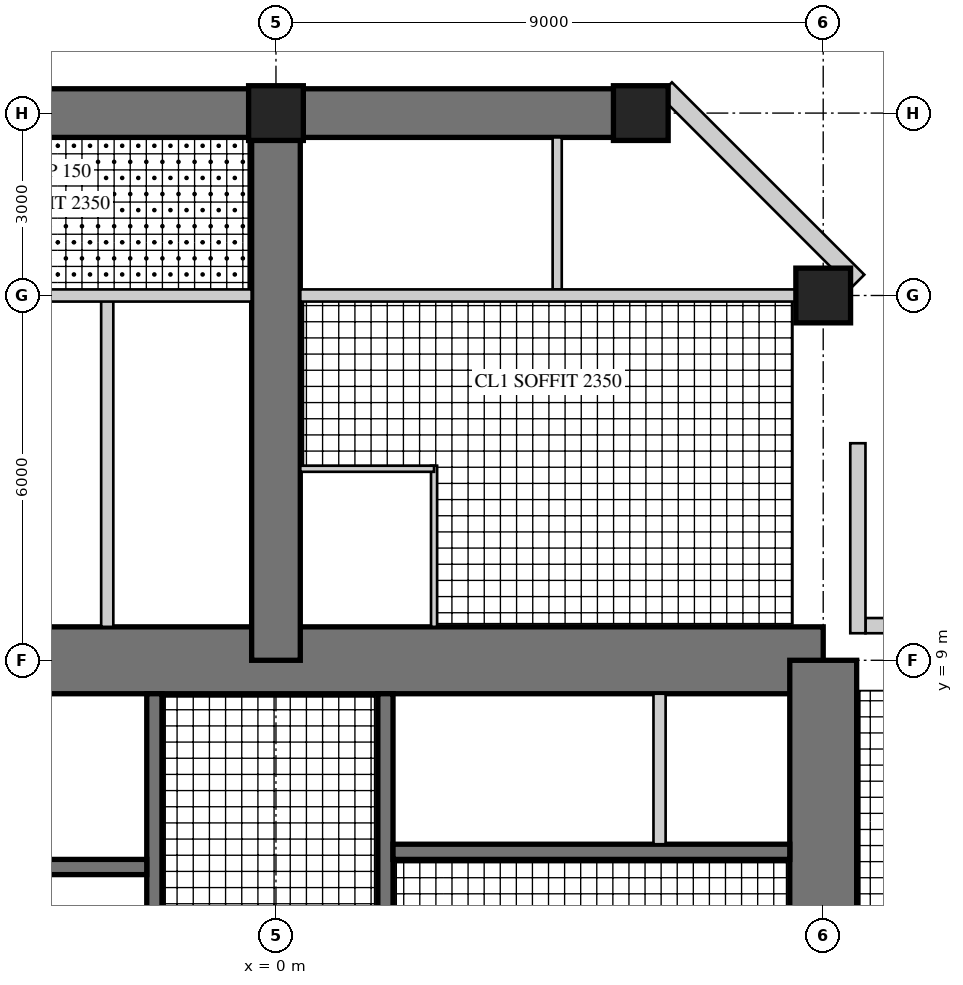
"""IFC4 building model, lengths in metres.
Left out: names, types, materials, properties, quantities, classifications, styles, units other than length and angle.
Written with IfcOpenShell. Run it as: python <this file> out.ifc"""

import sys

from ifc_helpers import new_model, si_unit, direction, frame, frame_2d, origin, origin_2d, place, context, subcontext, project, spatial, rectangle, hollow_rectangle, extrude, element, fill, save


model = new_model("IFC4")
c1 = context("Model", 3, precision=1e-05, world=origin(), true_north=direction((0.0, 1.0)))
c2 = subcontext(c1, "Body", "Model", "MODEL_VIEW")
j1 = project(units=[si_unit("LENGTHUNIT", "METRE"), si_unit("PLANEANGLEUNIT", "RADIAN")], contexts=[c1])
p1 = place(None, origin())
s1 = spatial("IfcSite", under=j1, at=p1, CompositionType="ELEMENT")
p2 = place(p1, origin())
s2 = spatial("IfcBuilding", under=s1, at=p2, CompositionType="ELEMENT")
p3 = place(p2, frame((0.0, 0.0, 189.9)))
s3 = spatial("IfcBuildingStorey", under=s2, at=p3, CompositionType="ELEMENT", Elevation=189.9)
p4 = place(p3, frame((9.0, 9.0, 0.0), z_axis=(0.0, 0.0, 1.0), x_axis=(-1.0, 0.0, 0.0)))
e1 = element("IfcWall", 1, at=p4, inside=s3, PredefinedType="SHEAR", context=c2, shape_type="SweptSolid", body=[
    extrude(rectangle(XDim=18.0, YDim=1.1, at=frame_2d((9.0, 0.0))), origin(), (0.0, 0.0, 1.0), 3.4),
])
p5 = place(p4, frame((9.8, 0.0, 0.0)))
e2 = element("IfcOpeningElement", 2, at=p5, cuts=e1, PredefinedType="OPENING", context=c2, shape_type="SweptSolid", body=[
    extrude(rectangle(XDim=1.0, YDim=2.4, at=frame_2d((0.5, 1.2))), frame((0.0, 0.56, 0.0), z_axis=(0.0, -1.0, 0.0), x_axis=(1.0, 0.0, 0.0)), (0.0, 0.0, 1.0), 1.12),
])
p6 = place(p3, frame((9.0, -9.0, 0.0), z_axis=(0.0, 0.0, 1.0), x_axis=(0.0, 1.0, 0.0)))
e3 = element("IfcWall", 3, at=p6, inside=s3, PredefinedType="SHEAR", context=c2, shape_type="SweptSolid", body=[
    extrude(rectangle(XDim=18.0, YDim=1.1, at=frame_2d((9.0, 0.0))), origin(), (0.0, 0.0, 1.0), 3.4),
])
p7 = place(p6, frame((9.8, 0.0, 0.0)))
e4 = element("IfcOpeningElement", 4, at=p7, cuts=e3, PredefinedType="OPENING", context=c2, shape_type="SweptSolid", body=[
    extrude(rectangle(XDim=1.0, YDim=2.4, at=frame_2d((0.5, 1.2))), frame((0.0, 0.56, 0.0), z_axis=(0.0, -1.0, 0.0), x_axis=(1.0, 0.0, 0.0)), (0.0, 0.0, 1.0), 1.12),
])
p8 = place(p3, frame((1.8, 1.875, 0.0), z_axis=(0.0, 0.0, 1.0), x_axis=(0.0, 1.0, 0.0)))
e5 = element("IfcWall", 5, at=p8, inside=s3, PredefinedType="SHEAR", context=c2, shape_type="SweptSolid", body=[
    extrude(rectangle(XDim=6.575, YDim=0.25, at=frame_2d((3.288, 0.0))), origin(), (0.0, 0.0, 1.0), 3.4),
])
p9 = place(p8, frame((1.875, 0.0, 0.0)))
e6 = element("IfcOpeningElement", 6, at=p9, cuts=e5, PredefinedType="OPENING", context=c2, shape_type="SweptSolid", body=[
    extrude(rectangle(XDim=1.6, YDim=2.4, at=frame_2d((0.8, 1.2))), frame((0.0, 0.135, 0.0), z_axis=(0.0, -1.0, 0.0), x_axis=(1.0, 0.0, 0.0)), (0.0, 0.0, 1.0), 0.27),
])
p10 = place(p3, frame((1.925, 5.85, 0.0), z_axis=(0.0, 0.0, 1.0), x_axis=(1.0, 0.0, 0.0)))
e7 = element("IfcWall", 7, at=p10, inside=s3, PredefinedType="SHEAR", context=c2, shape_type="SweptSolid", body=[
    extrude(rectangle(XDim=6.525, YDim=0.25, at=frame_2d((3.262, 0.0))), origin(), (0.0, 0.0, 1.0), 3.4),
])
p11 = place(p10, frame((0.521, 0.0, 0.0)))
e8 = element("IfcOpeningElement", 8, at=p11, cuts=e7, PredefinedType="OPENING", context=c2, shape_type="SweptSolid", body=[
    extrude(rectangle(XDim=1.0, YDim=2.1, at=frame_2d((0.5, 1.05))), frame((0.0, 0.135, 0.0), z_axis=(0.0, -1.0, 0.0), x_axis=(1.0, 0.0, 0.0)), (0.0, 0.0, 1.0), 0.27),
])
p12 = place(p10, frame((5.004, 0.0, 0.0)))
e9 = element("IfcOpeningElement", 9, at=p12, cuts=e7, PredefinedType="OPENING", context=c2, shape_type="SweptSolid", body=[
    extrude(rectangle(XDim=1.0, YDim=2.1, at=frame_2d((0.5, 1.05))), frame((0.0, 0.135, 0.0), z_axis=(0.0, -1.0, 0.0), x_axis=(1.0, 0.0, 0.0)), (0.0, 0.0, 1.0), 0.27),
])
p13 = place(p3, frame((6.308, 5.975, 0.0), z_axis=(0.0, 0.0, 1.0), x_axis=(0.0, 1.0, 0.0)))
e10 = element("IfcWall", 10, at=p13, inside=s3, PredefinedType="PARTITIONING", context=c2, shape_type="SweptSolid", body=[
    extrude(rectangle(XDim=2.475, YDim=0.2, at=frame_2d((1.237, 0.0))), origin(), (0.0, 0.0, 1.0), 3.4),
])
p14 = place(p3, frame((-2.0, 1.675, 0.0), z_axis=(0.0, 0.0, 1.0), x_axis=(0.0, 1.0, 0.0)))
e11 = element("IfcWall", 11, at=p14, inside=s3, PredefinedType="SHEAR", context=c2, shape_type="SweptSolid", body=[
    extrude(rectangle(XDim=6.775, YDim=0.25, at=frame_2d((3.387, 0.0))), origin(), (0.0, 0.0, 1.0), 3.4),
])
p15 = place(p14, frame((0.725, 0.0, 0.0)))
e12 = element("IfcOpeningElement", 12, at=p15, cuts=e11, PredefinedType="OPENING", context=c2, shape_type="SweptSolid", body=[
    extrude(rectangle(XDim=1.0, YDim=2.1, at=frame_2d((0.5, 1.05))), frame((0.0, 0.135, 0.0), z_axis=(0.0, -1.0, 0.0), x_axis=(1.0, 0.0, 0.0)), (0.0, 0.0, 1.0), 0.27),
])
p16 = place(p3, frame((-2.125, 5.6, 0.0), z_axis=(0.0, 0.0, 1.0), x_axis=(-1.0, 0.0, 0.0)))
e13 = element("IfcWall", 13, at=p16, inside=s3, PredefinedType="SHEAR", context=c2, shape_type="SweptSolid", body=[
    extrude(rectangle(XDim=6.325, YDim=0.25, at=frame_2d((3.163, 0.0))), origin(), (0.0, 0.0, 1.0), 3.4),
])
p17 = place(p16, frame((0.175, 0.0, 0.0)))
e14 = element("IfcOpeningElement", 14, at=p17, cuts=e13, PredefinedType="OPENING", context=c2, shape_type="SweptSolid", body=[
    extrude(rectangle(XDim=1.0, YDim=2.1, at=frame_2d((0.5, 1.05))), frame((0.0, 0.135, 0.0), z_axis=(0.0, -1.0, 0.0), x_axis=(1.0, 0.0, 0.0)), (0.0, 0.0, 1.0), 0.27),
])
p18 = place(p3, frame((0.0, 9.0, 0.0), z_axis=(0.0, 0.0, 1.0), x_axis=(0.0, 1.0, 0.0)))
e15 = element("IfcWall", 15, at=p18, inside=s3, PredefinedType="SHEAR", context=c2, shape_type="SweptSolid", body=[
    extrude(rectangle(XDim=9.0, YDim=0.8, at=frame_2d((4.5, 0.0))), origin(), (0.0, 0.0, 1.0), 3.4),
])
p19 = place(p18, frame((3.95, 0.0, 0.0)))
e16 = element("IfcOpeningElement", 16, at=p19, cuts=e15, PredefinedType="OPENING", context=c2, shape_type="SweptSolid", body=[
    extrude(rectangle(XDim=1.0, YDim=2.15, at=frame_2d((0.5, 1.075))), frame((0.0, 0.41, 0.0), z_axis=(0.0, -1.0, 0.0), x_axis=(1.0, 0.0, 0.0)), (0.0, 0.0, 1.0), 0.82),
])
p20 = place(p18, frame((7.0, 0.0, 0.0)))
e17 = element("IfcOpeningElement", 17, at=p20, cuts=e15, PredefinedType="OPENING", context=c2, shape_type="SweptSolid", body=[
    extrude(rectangle(XDim=1.0, YDim=2.2, at=frame_2d((0.5, 1.1))), frame((0.0, 0.41, 0.0), z_axis=(0.0, -1.0, 0.0), x_axis=(1.0, 0.0, 0.0)), (0.0, 0.0, 1.0), 0.82),
])
p21 = place(p3, frame((6.0, 18.0, 0.0), z_axis=(0.0, 0.0, 1.0), x_axis=(-1.0, 0.0, 0.0)))
e18 = element("IfcWall", 18, at=p21, inside=s3, PredefinedType="SHEAR", context=c2, shape_type="SweptSolid", body=[
    extrude(rectangle(XDim=12.0, YDim=0.8, at=frame_2d((6.0, 0.0))), origin(), (0.0, 0.0, 1.0), 3.4),
])
p22 = place(p21, frame((1.625, 0.0, 0.6)))
e19 = element("IfcOpeningElement", 19, at=p22, cuts=e18, PredefinedType="OPENING", context=c2, shape_type="SweptSolid", body=[
    extrude(rectangle(XDim=3.0, YDim=2.4, at=frame_2d((1.5, 1.2))), frame((0.0, 0.41, 0.0), z_axis=(0.0, -1.0, 0.0), x_axis=(1.0, 0.0, 0.0)), (0.0, 0.0, 1.0), 0.82),
])
p23 = place(p21, frame((7.375, 0.0, 0.6)))
e20 = element("IfcOpeningElement", 20, at=p23, cuts=e18, PredefinedType="OPENING", context=c2, shape_type="SweptSolid", body=[
    extrude(rectangle(XDim=3.0, YDim=2.4, at=frame_2d((1.5, 1.2))), frame((0.0, 0.41, 0.0), z_axis=(0.0, -1.0, 0.0), x_axis=(1.0, 0.0, 0.0)), (0.0, 0.0, 1.0), 0.82),
])
for number, where, z_axis, x_axis in (
    (21, (9.0, 15.0, 0.0), (0.0, 0.0, 1.0), (1.0, 0.0, 0.0)),
    (22, (6.0, 18.0, 0.0), (0.0, 0.0, 1.0), (1.0, 0.0, 0.0)),
    (23, (0.0, 18.0, 0.0), (0.0, 0.0, 1.0), (1.0, 0.0, 0.0)),
):
    element("IfcColumn", number, at=place(p3, frame(where, z_axis=z_axis, x_axis=x_axis)), inside=s3, PredefinedType="COLUMN", context=c2, shape_type="SweptSolid", body=[
        extrude(rectangle(XDim=0.9, YDim=0.9, at=origin_2d()), origin(), (0.0, 0.0, 1.0), 3.4),
    ])
p24 = place(p3, frame((12.57, 9.57, 0.0), z_axis=(0.0, 0.0, 1.0), x_axis=(-1.0, 0.0, 0.0)))
e24 = element("IfcWall", 24, at=p24, inside=s3, PredefinedType="SOLIDWALL", context=c2, shape_type="SweptSolid", body=[
    extrude(rectangle(XDim=2.875, YDim=0.25, at=frame_2d((1.438, 0.0))), origin(), (0.0, 0.0, 1.0), 3.22),
])
p25 = place(p24, frame((0.6, 0.0, 0.0)))
e25 = element("IfcOpeningElement", 25, at=p25, cuts=e24, PredefinedType="OPENING", context=c2, shape_type="SweptSolid", body=[
    extrude(rectangle(XDim=1.0, YDim=2.2, at=frame_2d((0.5, 1.1))), frame((0.0, 0.135, 0.0), z_axis=(0.0, -1.0, 0.0), x_axis=(1.0, 0.0, 0.0)), (0.0, 0.0, 1.0), 0.27),
])
p26 = place(p3, frame((9.57, 9.445, 0.0), z_axis=(0.0, 0.0, 1.0), x_axis=(0.0, 1.0, 0.0)))
e26 = element("IfcWall", 26, at=p26, inside=s3, PredefinedType="SOLIDWALL", context=c2, shape_type="SweptSolid", body=[
    extrude(rectangle(XDim=3.125, YDim=0.25, at=frame_2d((1.562, 0.0))), origin(), (0.0, 0.0, 1.0), 3.22),
])
p27 = place(p26, frame((0.6, 0.0, 0.0)))
e27 = element("IfcOpeningElement", 27, at=p27, cuts=e26, PredefinedType="OPENING", context=c2, shape_type="SweptSolid", body=[
    extrude(rectangle(XDim=1.0, YDim=2.2, at=frame_2d((0.5, 1.1))), frame((0.0, 0.135, 0.0), z_axis=(0.0, -1.0, 0.0), x_axis=(1.0, 0.0, 0.0)), (0.0, 0.0, 1.0), 0.27),
])
p28 = place(p3, frame((9.57, 15.236, 0.0), z_axis=(0.0, 0.0, 1.0), x_axis=(-0.707134062067, 0.707079499254, 0.0)))
e28 = element("IfcWall", 28, at=p28, inside=s3, PredefinedType="SOLIDWALL", context=c2, shape_type="SweptSolid", body=[
    extrude(rectangle(XDim=4.475, YDim=0.3, at=frame_2d((2.237, 0.0))), origin(), (0.0, 0.0, 1.0), 3.22),
])
p29 = place(p28, frame((1.787, 0.0, 0.3)))
e29 = element("IfcOpeningElement", 29, at=p29, cuts=e28, PredefinedType="OPENING", context=c2, shape_type="SweptSolid", body=[
    extrude(rectangle(XDim=0.9, YDim=2.4, at=frame_2d((0.45, 1.2))), frame((0.0, 0.16, 0.0), z_axis=(0.0, -1.0, 0.0), x_axis=(1.0, 0.0, 0.0)), (0.0, 0.0, 1.0), 0.32),
])
p30 = place(p3, frame((2.6, 9.55, 0.0), z_axis=(0.0, 0.0, 1.0), x_axis=(0.0, 1.0, 0.0)))
e30 = element("IfcWall", 30, at=p30, inside=s3, PredefinedType="PARTITIONING", context=c2, shape_type="SweptSolid", body=[
    extrude(rectangle(XDim=2.65, YDim=0.1, at=frame_2d((1.325, 0.0))), origin(), (0.0, 0.0, 1.0), 3.22),
])
p31 = place(p3, frame((2.6, 12.15, 0.0), z_axis=(0.0, 0.0, 1.0), x_axis=(-1.0, 0.0, 0.0)))
e31 = element("IfcWall", 31, at=p31, inside=s3, PredefinedType="PARTITIONING", context=c2, shape_type="SweptSolid", body=[
    extrude(rectangle(XDim=2.2, YDim=0.1, at=frame_2d((1.1, 0.0))), origin(), (0.0, 0.0, 1.0), 3.22),
])
p32 = place(p31, frame((0.55, 0.0, 0.0)))
e32 = element("IfcOpeningElement", 32, at=p32, cuts=e31, PredefinedType="OPENING", context=c2, shape_type="SweptSolid", body=[
    extrude(rectangle(XDim=0.9, YDim=2.1, at=frame_2d((0.45, 1.05))), frame((0.0, 0.06, 0.0), z_axis=(0.0, -1.0, 0.0), x_axis=(1.0, 0.0, 0.0)), (0.0, 0.0, 1.0), 0.12),
])
p33 = place(p3, frame((-2.775, 9.55, 0.0), z_axis=(0.0, 0.0, 1.0), x_axis=(0.0, 1.0, 0.0)))
e33 = element("IfcWall", 33, at=p33, inside=s3, PredefinedType="SOLIDWALL", context=c2, shape_type="SweptSolid", body=[
    extrude(rectangle(XDim=5.45, YDim=0.2, at=frame_2d((2.725, 0.0))), origin(), (0.0, 0.0, 1.0), 3.22),
])
p34 = place(p33, frame((1.2, 0.0, 0.0)))
e34 = element("IfcOpeningElement", 34, at=p34, cuts=e33, PredefinedType="OPENING", context=c2, shape_type="SweptSolid", body=[
    extrude(rectangle(XDim=1.0, YDim=2.2, at=frame_2d((0.5, 1.1))), frame((0.0, 0.11, 0.0), z_axis=(0.0, -1.0, 0.0), x_axis=(1.0, 0.0, 0.0)), (0.0, 0.0, 1.0), 0.22),
])
p35 = place(p3, frame((4.625, 15.1, 0.0), z_axis=(0.0, 0.0, 1.0), x_axis=(0.0, 1.0, 0.0)))
e35 = element("IfcWall", 35, at=p35, inside=s3, PredefinedType="PARTITIONING", context=c2, shape_type="SweptSolid", body=[
    extrude(rectangle(XDim=2.5, YDim=0.15, at=frame_2d((1.25, 0.0))), origin(), (0.0, 0.0, 1.0), 3.22),
])
p36 = place(p35, frame((0.6, 0.0, 0.0)))
e36 = element("IfcOpeningElement", 36, at=p36, cuts=e35, PredefinedType="OPENING", context=c2, shape_type="SweptSolid", body=[
    extrude(rectangle(XDim=1.0, YDim=2.1, at=frame_2d((0.5, 1.05))), frame((0.0, 0.085, 0.0), z_axis=(0.0, -1.0, 0.0), x_axis=(1.0, 0.0, 0.0)), (0.0, 0.0, 1.0), 0.17),
])
p37 = place(p3, frame((8.55, 15.0, 0.0), z_axis=(0.0, 0.0, 1.0), x_axis=(-1.0, 0.0, 0.0)))
e37 = element("IfcWall", 37, at=p37, inside=s3, PredefinedType="SOLIDWALL", context=c2, shape_type="SweptSolid", body=[
    extrude(rectangle(XDim=8.15, YDim=0.2, at=frame_2d((4.075, 0.0))), origin(), (0.0, 0.0, 1.0), 2.47),
])
p38 = place(p3, frame((-0.4, 15.0, 0.0), z_axis=(0.0, 0.0, 1.0), x_axis=(-1.0, 0.0, 0.0)))
e38 = element("IfcWall", 38, at=p38, inside=s3, PredefinedType="SOLIDWALL", context=c2, shape_type="SweptSolid", body=[
    extrude(rectangle(XDim=8.15, YDim=0.2, at=frame_2d((4.075, 0.0))), origin(), (0.0, 0.0, 1.0), 2.47),
])
p39 = place(p38, frame((0.4, 0.0, 0.0)))
e39 = element("IfcOpeningElement", 39, at=p39, cuts=e38, PredefinedType="OPENING", context=c2, shape_type="SweptSolid", body=[
    extrude(rectangle(XDim=1.0, YDim=2.2, at=frame_2d((0.5, 1.1))), frame((0.0, 0.11, 0.0), z_axis=(0.0, -1.0, 0.0), x_axis=(1.0, 0.0, 0.0)), (0.0, 0.0, 1.0), 0.22),
])
p40 = place(p27, origin())
e40 = element("IfcDoor", 40, at=p40, inside=s3, OperationType="SINGLE_SWING_LEFT", PredefinedType="DOOR", context=c2, shape_type="SweptSolid", body=[
    extrude(hollow_rectangle(XDim=1.0, YDim=2.2, WallThickness=0.06, at=frame_2d((0.5, 1.1))), frame((0.0, 0.025, 0.0), z_axis=(0.0, -1.0, 0.0), x_axis=(1.0, 0.0, 0.0)), (0.0, 0.0, 1.0), 0.05),
    extrude(rectangle(XDim=0.879, YDim=2.079, at=frame_2d((0.5, 1.1))), frame((0.0, 0.025, 0.0), z_axis=(0.0, -1.0, 0.0), x_axis=(1.0, 0.0, 0.0)), (0.0, 0.0, 1.0), 0.05),
])
fill(e27, e40)
p41 = place(p29, origin())
e41 = element("IfcWindow", 41, at=p41, inside=s3, PartitioningType="SINGLE_PANEL", PredefinedType="WINDOW", context=c2, shape_type="SweptSolid", body=[
    extrude(hollow_rectangle(XDim=0.9, YDim=2.4, WallThickness=0.06, at=frame_2d((0.45, 1.2))), frame((0.0, 0.03, 0.0), z_axis=(0.0, -1.0, 0.0), x_axis=(1.0, 0.0, 0.0)), (0.0, 0.0, 1.0), 0.06),
    extrude(rectangle(XDim=0.779, YDim=2.279, at=frame_2d((0.45, 1.2))), frame((0.0, 0.03, 0.0), z_axis=(0.0, -1.0, 0.0), x_axis=(1.0, 0.0, 0.0)), (0.0, 0.0, 1.0), 0.06),
])
fill(e29, e41)
p42 = place(p22, origin())
e42 = element("IfcWindow", 42, at=p42, inside=s3, PartitioningType="SINGLE_PANEL", PredefinedType="WINDOW", context=c2, shape_type="SweptSolid", body=[
    extrude(hollow_rectangle(XDim=3.0, YDim=2.4, WallThickness=0.06, at=frame_2d((1.5, 1.2))), frame((0.0, 0.03, 0.0), z_axis=(0.0, -1.0, 0.0), x_axis=(1.0, 0.0, 0.0)), (0.0, 0.0, 1.0), 0.06),
    extrude(rectangle(XDim=2.879, YDim=2.279, at=frame_2d((1.5, 1.2))), frame((0.0, 0.03, 0.0), z_axis=(0.0, -1.0, 0.0), x_axis=(1.0, 0.0, 0.0)), (0.0, 0.0, 1.0), 0.06),
])
fill(e19, e42)
p43 = place(p23, origin())
e43 = element("IfcWindow", 43, at=p43, inside=s3, PartitioningType="SINGLE_PANEL", PredefinedType="WINDOW", context=c2, shape_type="SweptSolid", body=[
    extrude(hollow_rectangle(XDim=3.0, YDim=2.4, WallThickness=0.06, at=frame_2d((1.5, 1.2))), frame((0.0, 0.03, 0.0), z_axis=(0.0, -1.0, 0.0), x_axis=(1.0, 0.0, 0.0)), (0.0, 0.0, 1.0), 0.06),
    extrude(rectangle(XDim=2.879, YDim=2.279, at=frame_2d((1.5, 1.2))), frame((0.0, 0.03, 0.0), z_axis=(0.0, -1.0, 0.0), x_axis=(1.0, 0.0, 0.0)), (0.0, 0.0, 1.0), 0.06),
])
fill(e20, e43)
p44 = place(p32, origin())
e44 = element("IfcDoor", 44, at=p44, inside=s3, OperationType="SINGLE_SWING_LEFT", PredefinedType="DOOR", context=c2, shape_type="SweptSolid", body=[
    extrude(rectangle(XDim=0.9, YDim=2.1, at=frame_2d((0.45, 1.05))), frame((0.0, 0.025, 0.0), z_axis=(0.0, -1.0, 0.0), x_axis=(1.0, 0.0, 0.0)), (0.0, 0.0, 1.0), 0.05),
])
fill(e32, e44)
p45 = place(p34, origin())
e45 = element("IfcDoor", 45, at=p45, inside=s3, OperationType="SINGLE_SWING_LEFT", PredefinedType="DOOR", context=c2, shape_type="SweptSolid", body=[
    extrude(rectangle(XDim=1.0, YDim=2.2, at=frame_2d((0.5, 1.1))), frame((0.0, 0.025, 0.0), z_axis=(0.0, -1.0, 0.0), x_axis=(1.0, 0.0, 0.0)), (0.0, 0.0, 1.0), 0.05),
])
fill(e34, e45)
p46 = place(p36, frame((1.0, 0.0, 0.0), z_axis=(0.0, 0.0, 1.0), x_axis=(-1.0, 0.0, 0.0)))
e46 = element("IfcDoor", 46, at=p46, inside=s3, OperationType="SINGLE_SWING_RIGHT", PredefinedType="DOOR", context=c2, shape_type="SweptSolid", body=[
    extrude(rectangle(XDim=1.0, YDim=2.1, at=frame_2d((0.5, 1.05))), frame((0.0, 0.025, 0.0), z_axis=(0.0, -1.0, 0.0), x_axis=(1.0, 0.0, 0.0)), (0.0, 0.0, 1.0), 0.05),
])
fill(e36, e46)
p47 = place(p39, frame((1.0, 0.0, 0.0), z_axis=(0.0, 0.0, 1.0), x_axis=(-1.0, 0.0, 0.0)))
e47 = element("IfcDoor", 47, at=p47, inside=s3, OperationType="SINGLE_SWING_RIGHT", PredefinedType="DOOR", context=c2, shape_type="SweptSolid", body=[
    extrude(rectangle(XDim=1.0, YDim=2.2, at=frame_2d((0.5, 1.1))), frame((0.0, 0.025, 0.0), z_axis=(0.0, -1.0, 0.0), x_axis=(1.0, 0.0, 0.0)), (0.0, 0.0, 1.0), 0.05),
])
fill(e39, e47)
p48 = place(p19, frame((1.0, 0.0, 0.0), z_axis=(0.0, 0.0, 1.0), x_axis=(-1.0, 0.0, 0.0)))
e48 = element("IfcDoor", 48, at=p48, inside=s3, OperationType="SINGLE_SWING_RIGHT", PredefinedType="DOOR", context=c2, shape_type="SweptSolid", body=[
    extrude(rectangle(XDim=1.0, YDim=2.15, at=frame_2d((0.5, 1.075))), frame((0.0, 0.025, 0.0), z_axis=(0.0, -1.0, 0.0), x_axis=(1.0, 0.0, 0.0)), (0.0, 0.0, 1.0), 0.05),
])
fill(e16, e48)
p49 = place(p20, frame((1.0, 0.0, 0.0), z_axis=(0.0, 0.0, 1.0), x_axis=(-1.0, 0.0, 0.0)))
e49 = element("IfcDoor", 49, at=p49, inside=s3, OperationType="SINGLE_SWING_LEFT", PredefinedType="DOOR", context=c2, shape_type="SweptSolid", body=[
    extrude(rectangle(XDim=1.0, YDim=2.2, at=frame_2d((0.5, 1.1))), frame((0.0, 0.025, 0.0), z_axis=(0.0, -1.0, 0.0), x_axis=(1.0, 0.0, 0.0)), (0.0, 0.0, 1.0), 0.05),
])
fill(e17, e49)
p50 = place(p5, origin())
e50 = element("IfcDoor", 50, at=p50, inside=s3, OperationType="SINGLE_SWING_RIGHT", PredefinedType="DOOR", context=c2, shape_type="SweptSolid", body=[
    extrude(rectangle(XDim=1.0, YDim=2.4, at=frame_2d((0.5, 1.2))), frame((0.0, 0.055, 0.0), z_axis=(0.0, -1.0, 0.0), x_axis=(1.0, 0.0, 0.0)), (0.0, 0.0, 1.0), 0.05),
])
fill(e2, e50)
p51 = place(p9, frame((1.6, 0.0, 0.0), z_axis=(0.0, 0.0, 1.0), x_axis=(-1.0, 0.0, 0.0)))
e51 = element("IfcDoor", 51, at=p51, inside=s3, OperationType="DOUBLE_DOOR_SINGLE_SWING", PredefinedType="DOOR", context=c2, shape_type="SweptSolid", body=[
    extrude(rectangle(XDim=1.6, YDim=2.4, at=frame_2d((0.8, 1.2))), frame((0.0, 0.025, 0.0), z_axis=(0.0, -1.0, 0.0), x_axis=(1.0, 0.0, 0.0)), (0.0, 0.0, 1.0), 0.05),
])
fill(e6, e51)
p52 = place(p17, frame((1.0, 0.0, 0.0), z_axis=(0.0, 0.0, 1.0), x_axis=(-1.0, 0.0, 0.0)))
e52 = element("IfcDoor", 52, at=p52, inside=s3, OperationType="SINGLE_SWING_RIGHT", PredefinedType="DOOR", context=c2, shape_type="SweptSolid", body=[
    extrude(rectangle(XDim=1.0, YDim=2.1, at=frame_2d((0.5, 1.05))), frame((0.0, 0.025, 0.0), z_axis=(0.0, -1.0, 0.0), x_axis=(1.0, 0.0, 0.0)), (0.0, 0.0, 1.0), 0.05),
])
fill(e14, e52)
p53 = place(p11, origin())
e53 = element("IfcDoor", 53, at=p53, inside=s3, OperationType="SINGLE_SWING_LEFT", PredefinedType="DOOR", context=c2, shape_type="SweptSolid", body=[
    extrude(rectangle(XDim=1.0, YDim=2.1, at=frame_2d((0.5, 1.05))), frame((0.0, 0.025, 0.0), z_axis=(0.0, -1.0, 0.0), x_axis=(1.0, 0.0, 0.0)), (0.0, 0.0, 1.0), 0.05),
])
fill(e8, e53)
p54 = place(p12, origin())
e54 = element("IfcDoor", 54, at=p54, inside=s3, OperationType="SINGLE_SWING_RIGHT", PredefinedType="DOOR", context=c2, shape_type="SweptSolid", body=[
    extrude(rectangle(XDim=1.0, YDim=2.1, at=frame_2d((0.5, 1.05))), frame((0.0, 0.025, 0.0), z_axis=(0.0, -1.0, 0.0), x_axis=(1.0, 0.0, 0.0)), (0.0, 0.0, 1.0), 0.05),
])
fill(e9, e54)
save(model, sys.argv[1])
